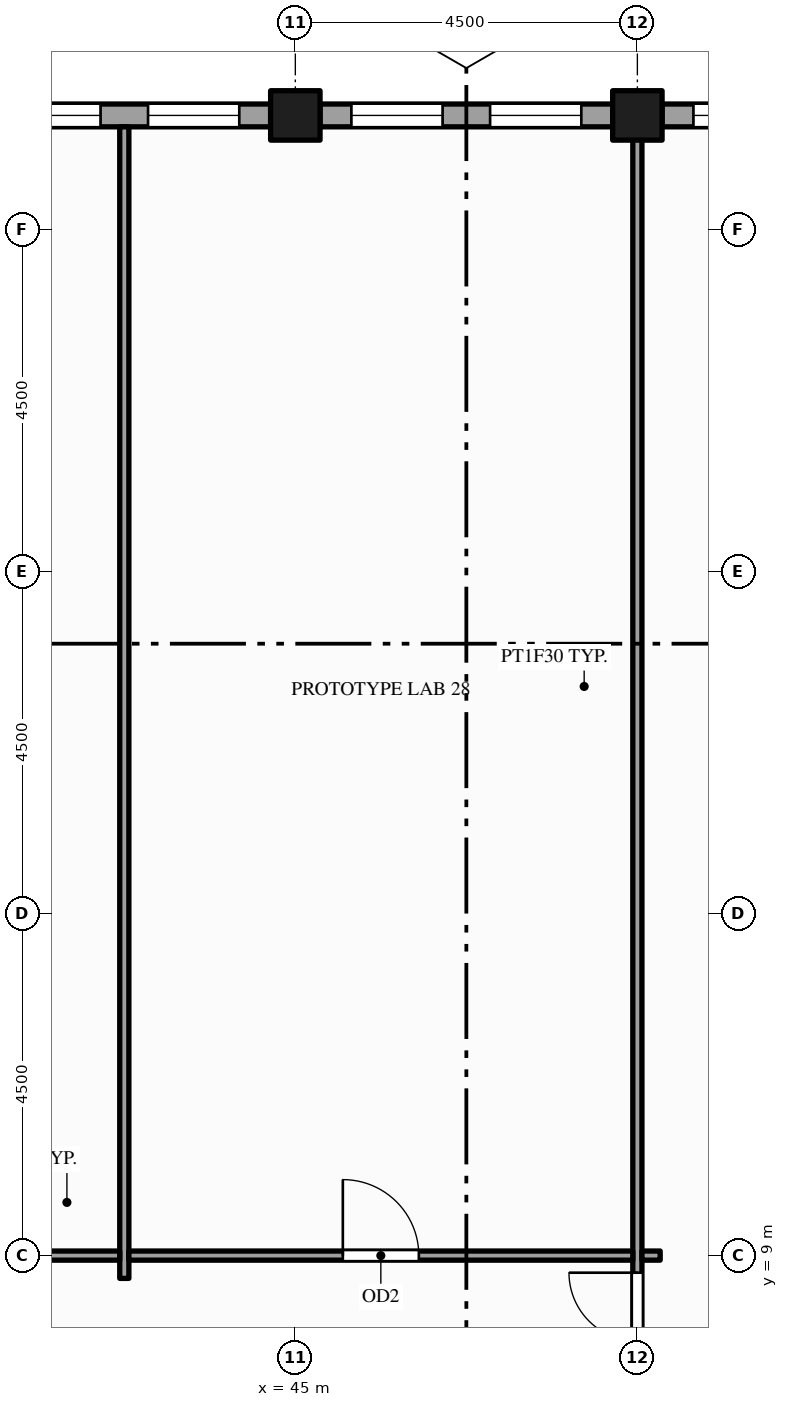
"""IFC4 building model, lengths in metres.
Left out: names, types, materials, properties, quantities, classifications, styles, units other than length and angle.
Written with IfcOpenShell. Run it as: python <this file> out.ifc"""

import sys

from ifc_helpers import new_model, si_unit, direction, frame, frame_2d, origin, origin_2d, place, context, subcontext, project, spatial, rectangle, hollow_rectangle, extrude, element, fill, save


model = new_model("IFC4")
c1 = context("Model", 3, precision=1e-05, world=origin(), true_north=direction((0.0, 1.0)))
c2 = subcontext(c1, "Body", "Model", "MODEL_VIEW")
j1 = project(units=[si_unit("LENGTHUNIT", "METRE"), si_unit("PLANEANGLEUNIT", "RADIAN")], contexts=[c1])
p1 = place(None, origin())
s1 = spatial("IfcSite", under=j1, at=p1, CompositionType="ELEMENT")
p2 = place(p1, origin())
s2 = spatial("IfcBuilding", under=s1, at=p2, CompositionType="ELEMENT")
p3 = place(p2, frame((0.0, 0.0, 269.0)))
s3 = spatial("IfcBuildingStorey", under=s2, at=p3, CompositionType="ELEMENT", Elevation=269.0)
for number, where, z_axis, x_axis in (
    (1, (45.0, 24.0, -0.15), (0.0, 0.0, 1.0), (1.0, 0.0, 0.0)),
    (2, (49.5, 24.0, -0.15), (0.0, 0.0, 1.0), (1.0, 0.0, 0.0)),
):
    element("IfcColumn", number, at=place(p3, frame(where, z_axis=z_axis, x_axis=x_axis)), inside=s3, PredefinedType="COLUMN", context=c2, shape_type="SweptSolid", body=[
        extrude(hollow_rectangle(XDim=0.65, YDim=0.65, WallThickness=0.032, at=origin_2d()), origin(), (0.0, 0.0, 1.0), 4.0),
    ])
p4 = place(p3, frame((53.675, 24.0, 0.0), z_axis=(0.0, 0.0, 1.0), x_axis=(-1.0, 0.0, 0.0)))
e3 = element("IfcWall", 3, at=p4, inside=s3, PredefinedType="STANDARD", context=c2, shape_type="SweptSolid", body=[
    extrude(rectangle(XDim=3.85, YDim=0.3, at=frame_2d((1.925, 0.0))), origin(), (0.0, 0.0, 1.0), 2.87),
])
p5 = place(p4, frame((0.413, 0.0, 0.9)))
e4 = element("IfcOpeningElement", 4, at=p5, cuts=e3, PredefinedType="OPENING", context=c2, shape_type="SweptSolid", body=[
    extrude(rectangle(XDim=1.2, YDim=1.75, at=frame_2d((0.6, 0.875))), frame((0.0, 0.16, 0.0), z_axis=(0.0, -1.0, 0.0), x_axis=(1.0, 0.0, 0.0)), (0.0, 0.0, 1.0), 0.32),
])
p6 = place(p4, frame((2.238, 0.0, 0.9)))
e5 = element("IfcOpeningElement", 5, at=p6, cuts=e3, PredefinedType="OPENING", context=c2, shape_type="SweptSolid", body=[
    extrude(rectangle(XDim=1.2, YDim=1.75, at=frame_2d((0.6, 0.875))), frame((0.0, 0.16, 0.0), z_axis=(0.0, -1.0, 0.0), x_axis=(1.0, 0.0, 0.0)), (0.0, 0.0, 1.0), 0.32),
])
p7 = place(p3, frame((49.175, 24.0, 0.0), z_axis=(0.0, 0.0, 1.0), x_axis=(-1.0, 0.0, 0.0)))
e6 = element("IfcWall", 6, at=p7, inside=s3, PredefinedType="STANDARD", context=c2, shape_type="SweptSolid", body=[
    extrude(rectangle(XDim=3.85, YDim=0.3, at=frame_2d((1.925, 0.0))), origin(), (0.0, 0.0, 1.0), 2.87),
])
p8 = place(p7, frame((0.413, 0.0, 0.9)))
e7 = element("IfcOpeningElement", 7, at=p8, cuts=e6, PredefinedType="OPENING", context=c2, shape_type="SweptSolid", body=[
    extrude(rectangle(XDim=1.2, YDim=1.75, at=frame_2d((0.6, 0.875))), frame((0.0, 0.16, 0.0), z_axis=(0.0, -1.0, 0.0), x_axis=(1.0, 0.0, 0.0)), (0.0, 0.0, 1.0), 0.32),
])
p9 = place(p7, frame((2.238, 0.0, 0.9)))
e8 = element("IfcOpeningElement", 8, at=p9, cuts=e6, PredefinedType="OPENING", context=c2, shape_type="SweptSolid", body=[
    extrude(rectangle(XDim=1.2, YDim=1.75, at=frame_2d((0.6, 0.875))), frame((0.0, 0.16, 0.0), z_axis=(0.0, -1.0, 0.0), x_axis=(1.0, 0.0, 0.0)), (0.0, 0.0, 1.0), 0.32),
])
p10 = place(p3, frame((44.675, 24.0, 0.0), z_axis=(0.0, 0.0, 1.0), x_axis=(-1.0, 0.0, 0.0)))
e9 = element("IfcWall", 9, at=p10, inside=s3, PredefinedType="STANDARD", context=c2, shape_type="SweptSolid", body=[
    extrude(rectangle(XDim=3.85, YDim=0.3, at=frame_2d((1.925, 0.0))), origin(), (0.0, 0.0, 1.0), 2.87),
])
p11 = place(p10, frame((0.413, 0.0, 0.9)))
e10 = element("IfcOpeningElement", 10, at=p11, cuts=e9, PredefinedType="OPENING", context=c2, shape_type="SweptSolid", body=[
    extrude(rectangle(XDim=1.2, YDim=1.75, at=frame_2d((0.6, 0.875))), frame((0.0, 0.16, 0.0), z_axis=(0.0, -1.0, 0.0), x_axis=(1.0, 0.0, 0.0)), (0.0, 0.0, 1.0), 0.32),
])
p12 = place(p10, frame((2.238, 0.0, 0.9)))
e11 = element("IfcOpeningElement", 11, at=p12, cuts=e9, PredefinedType="OPENING", context=c2, shape_type="SweptSolid", body=[
    extrude(rectangle(XDim=1.2, YDim=1.75, at=frame_2d((0.6, 0.875))), frame((0.0, 0.16, 0.0), z_axis=(0.0, -1.0, 0.0), x_axis=(1.0, 0.0, 0.0)), (0.0, 0.0, 1.0), 0.32),
])
p13 = place(p3, frame((42.75, 8.7, 0.0), z_axis=(0.0, 0.0, 1.0), x_axis=(0.0, 1.0, 0.0)))
e12 = element("IfcWall", 12, at=p13, inside=s3, PredefinedType="PARTITIONING", context=c2, shape_type="SweptSolid", body=[
    extrude(rectangle(XDim=15.15, YDim=0.12, at=frame_2d((7.575, 0.0))), origin(), (0.0, 0.0, 1.0), 2.87),
])
p14 = place(p3, frame((49.5, 1.65, 0.0), z_axis=(0.0, 0.0, 1.0), x_axis=(0.0, 1.0, 0.0)))
e13 = element("IfcWall", 13, at=p14, inside=s3, PredefinedType="PARTITIONING", context=c2, shape_type="SweptSolid", body=[
    extrude(rectangle(XDim=22.2, YDim=0.12, at=frame_2d((11.1, 0.0))), origin(), (0.0, 0.0, 1.0), 2.87),
])
p15 = place(p14, frame((5.325, 0.0, 0.0)))
e14 = element("IfcOpeningElement", 14, at=p15, cuts=e13, PredefinedType="OPENING", context=c2, shape_type="SweptSolid", body=[
    extrude(rectangle(XDim=1.8, YDim=2.1, at=frame_2d((0.9, 1.05))), frame((0.0, 0.07, 0.0), z_axis=(0.0, -1.0, 0.0), x_axis=(1.0, 0.0, 0.0)), (0.0, 0.0, 1.0), 0.14),
])
p16 = place(p14, frame((0.54, 0.0, 0.0)))
e15 = element("IfcOpeningElement", 15, at=p16, cuts=e13, PredefinedType="OPENING", context=c2, shape_type="SweptSolid", body=[
    extrude(rectangle(XDim=0.9, YDim=2.1, at=frame_2d((0.45, 1.05))), frame((0.0, 0.07, 0.0), z_axis=(0.0, -1.0, 0.0), x_axis=(1.0, 0.0, 0.0)), (0.0, 0.0, 1.0), 0.14),
])
p17 = place(p14, frame((2.025, 0.0, 0.0)))
e16 = element("IfcOpeningElement", 16, at=p17, cuts=e13, PredefinedType="OPENING", context=c2, shape_type="SweptSolid", body=[
    extrude(rectangle(XDim=0.9, YDim=2.1, at=frame_2d((0.45, 1.05))), frame((0.0, 0.07, 0.0), z_axis=(0.0, -1.0, 0.0), x_axis=(1.0, 0.0, 0.0)), (0.0, 0.0, 1.0), 0.14),
])
p18 = place(p14, frame((3.51, 0.0, 0.0)))
e17 = element("IfcOpeningElement", 17, at=p18, cuts=e13, PredefinedType="OPENING", context=c2, shape_type="SweptSolid", body=[
    extrude(rectangle(XDim=1.0, YDim=2.1, at=frame_2d((0.5, 1.05))), frame((0.0, 0.07, 0.0), z_axis=(0.0, -1.0, 0.0), x_axis=(1.0, 0.0, 0.0)), (0.0, 0.0, 1.0), 0.14),
])
p19 = place(p3, frame((38.31, 9.0, 0.0), z_axis=(0.0, 0.0, 1.0), x_axis=(1.0, 0.0, 0.0)))
e18 = element("IfcWall", 18, at=p19, inside=s3, PredefinedType="PARTITIONING", context=c2, shape_type="SweptSolid", body=[
    extrude(rectangle(XDim=4.38, YDim=0.12, at=frame_2d((2.19, 0.0))), origin(), (0.0, 0.0, 1.0), 2.87),
])
p20 = place(p19, frame((1.74, 0.0, 0.0)))
e19 = element("IfcOpeningElement", 19, at=p20, cuts=e18, PredefinedType="OPENING", context=c2, shape_type="SweptSolid", body=[
    extrude(rectangle(XDim=0.9, YDim=2.1, at=frame_2d((0.45, 1.05))), frame((0.0, 0.07, 0.0), z_axis=(0.0, -1.0, 0.0), x_axis=(1.0, 0.0, 0.0)), (0.0, 0.0, 1.0), 0.14),
])
p21 = place(p3, frame((42.81, 9.0, 0.0), z_axis=(0.0, 0.0, 1.0), x_axis=(1.0, 0.0, 0.0)))
e20 = element("IfcWall", 20, at=p21, inside=s3, PredefinedType="PARTITIONING", context=c2, shape_type="SweptSolid", body=[
    extrude(rectangle(XDim=6.63, YDim=0.12, at=frame_2d((3.315, 0.0))), origin(), (0.0, 0.0, 1.0), 2.87),
])
p22 = place(p21, frame((2.815, 0.0, 0.0)))
e21 = element("IfcOpeningElement", 21, at=p22, cuts=e20, PredefinedType="OPENING", context=c2, shape_type="SweptSolid", body=[
    extrude(rectangle(XDim=1.0, YDim=2.1, at=frame_2d((0.5, 1.05))), frame((0.0, 0.07, 0.0), z_axis=(0.0, -1.0, 0.0), x_axis=(1.0, 0.0, 0.0)), (0.0, 0.0, 1.0), 0.14),
])
p23 = place(p3, frame((49.56, 9.0, 0.0), z_axis=(0.0, 0.0, 1.0), x_axis=(1.0, 0.0, 0.0)))
e22 = element("IfcWall", 22, at=p23, inside=s3, PredefinedType="PARTITIONING", context=c2, shape_type="SweptSolid", body=[
    extrude(rectangle(XDim=0.24, YDim=0.12, at=frame_2d((0.12, 0.0))), origin(), (0.0, 0.0, 1.0), 2.87),
])
p24 = place(p6, origin())
e23 = element("IfcWindow", 23, at=p24, inside=s3, PartitioningType="SINGLE_PANEL", PredefinedType="WINDOW", context=c2, shape_type="SweptSolid", body=[
    extrude(rectangle(XDim=1.2, YDim=1.75, at=frame_2d((0.6, 0.875))), frame((0.0, 0.03, 0.0), z_axis=(0.0, -1.0, 0.0), x_axis=(1.0, 0.0, 0.0)), (0.0, 0.0, 1.0), 0.06),
])
fill(e5, e23)
p25 = place(p8, origin())
e24 = element("IfcWindow", 24, at=p25, inside=s3, PartitioningType="SINGLE_PANEL", PredefinedType="WINDOW", context=c2, shape_type="SweptSolid", body=[
    extrude(rectangle(XDim=1.2, YDim=1.75, at=frame_2d((0.6, 0.875))), frame((0.0, 0.03, 0.0), z_axis=(0.0, -1.0, 0.0), x_axis=(1.0, 0.0, 0.0)), (0.0, 0.0, 1.0), 0.06),
])
fill(e7, e24)
p26 = place(p9, origin())
e25 = element("IfcWindow", 25, at=p26, inside=s3, PartitioningType="SINGLE_PANEL", PredefinedType="WINDOW", context=c2, shape_type="SweptSolid", body=[
    extrude(rectangle(XDim=1.2, YDim=1.75, at=frame_2d((0.6, 0.875))), frame((0.0, 0.03, 0.0), z_axis=(0.0, -1.0, 0.0), x_axis=(1.0, 0.0, 0.0)), (0.0, 0.0, 1.0), 0.06),
])
fill(e8, e25)
p27 = place(p11, origin())
e26 = element("IfcWindow", 26, at=p27, inside=s3, PartitioningType="SINGLE_PANEL", PredefinedType="WINDOW", context=c2, shape_type="SweptSolid", body=[
    extrude(rectangle(XDim=1.2, YDim=1.75, at=frame_2d((0.6, 0.875))), frame((0.0, 0.03, 0.0), z_axis=(0.0, -1.0, 0.0), x_axis=(1.0, 0.0, 0.0)), (0.0, 0.0, 1.0), 0.06),
])
fill(e10, e26)
p28 = place(p12, origin())
e27 = element("IfcWindow", 27, at=p28, inside=s3, PartitioningType="SINGLE_PANEL", PredefinedType="WINDOW", context=c2, shape_type="SweptSolid", body=[
    extrude(rectangle(XDim=1.2, YDim=1.75, at=frame_2d((0.6, 0.875))), frame((0.0, 0.03, 0.0), z_axis=(0.0, -1.0, 0.0), x_axis=(1.0, 0.0, 0.0)), (0.0, 0.0, 1.0), 0.06),
])
fill(e11, e27)
p29 = place(p15, origin())
e28 = element("IfcDoor", 28, at=p29, inside=s3, OperationType="DOUBLE_DOOR_SINGLE_SWING", PredefinedType="DOOR", context=c2, shape_type="SweptSolid", body=[
    extrude(rectangle(XDim=1.8, YDim=2.1, at=frame_2d((0.9, 1.05))), frame((0.0, 0.025, 0.0), z_axis=(0.0, -1.0, 0.0), x_axis=(1.0, 0.0, 0.0)), (0.0, 0.0, 1.0), 0.05),
])
fill(e14, e28)
p30 = place(p22, origin())
e29 = element("IfcDoor", 29, at=p30, inside=s3, OperationType="SINGLE_SWING_LEFT", PredefinedType="DOOR", context=c2, shape_type="SweptSolid", body=[
    extrude(rectangle(XDim=1.0, YDim=2.1, at=frame_2d((0.5, 1.05))), frame((0.0, 0.025, 0.0), z_axis=(0.0, -1.0, 0.0), x_axis=(1.0, 0.0, 0.0)), (0.0, 0.0, 1.0), 0.05),
])
fill(e21, e29)
save(model, sys.argv[1])
